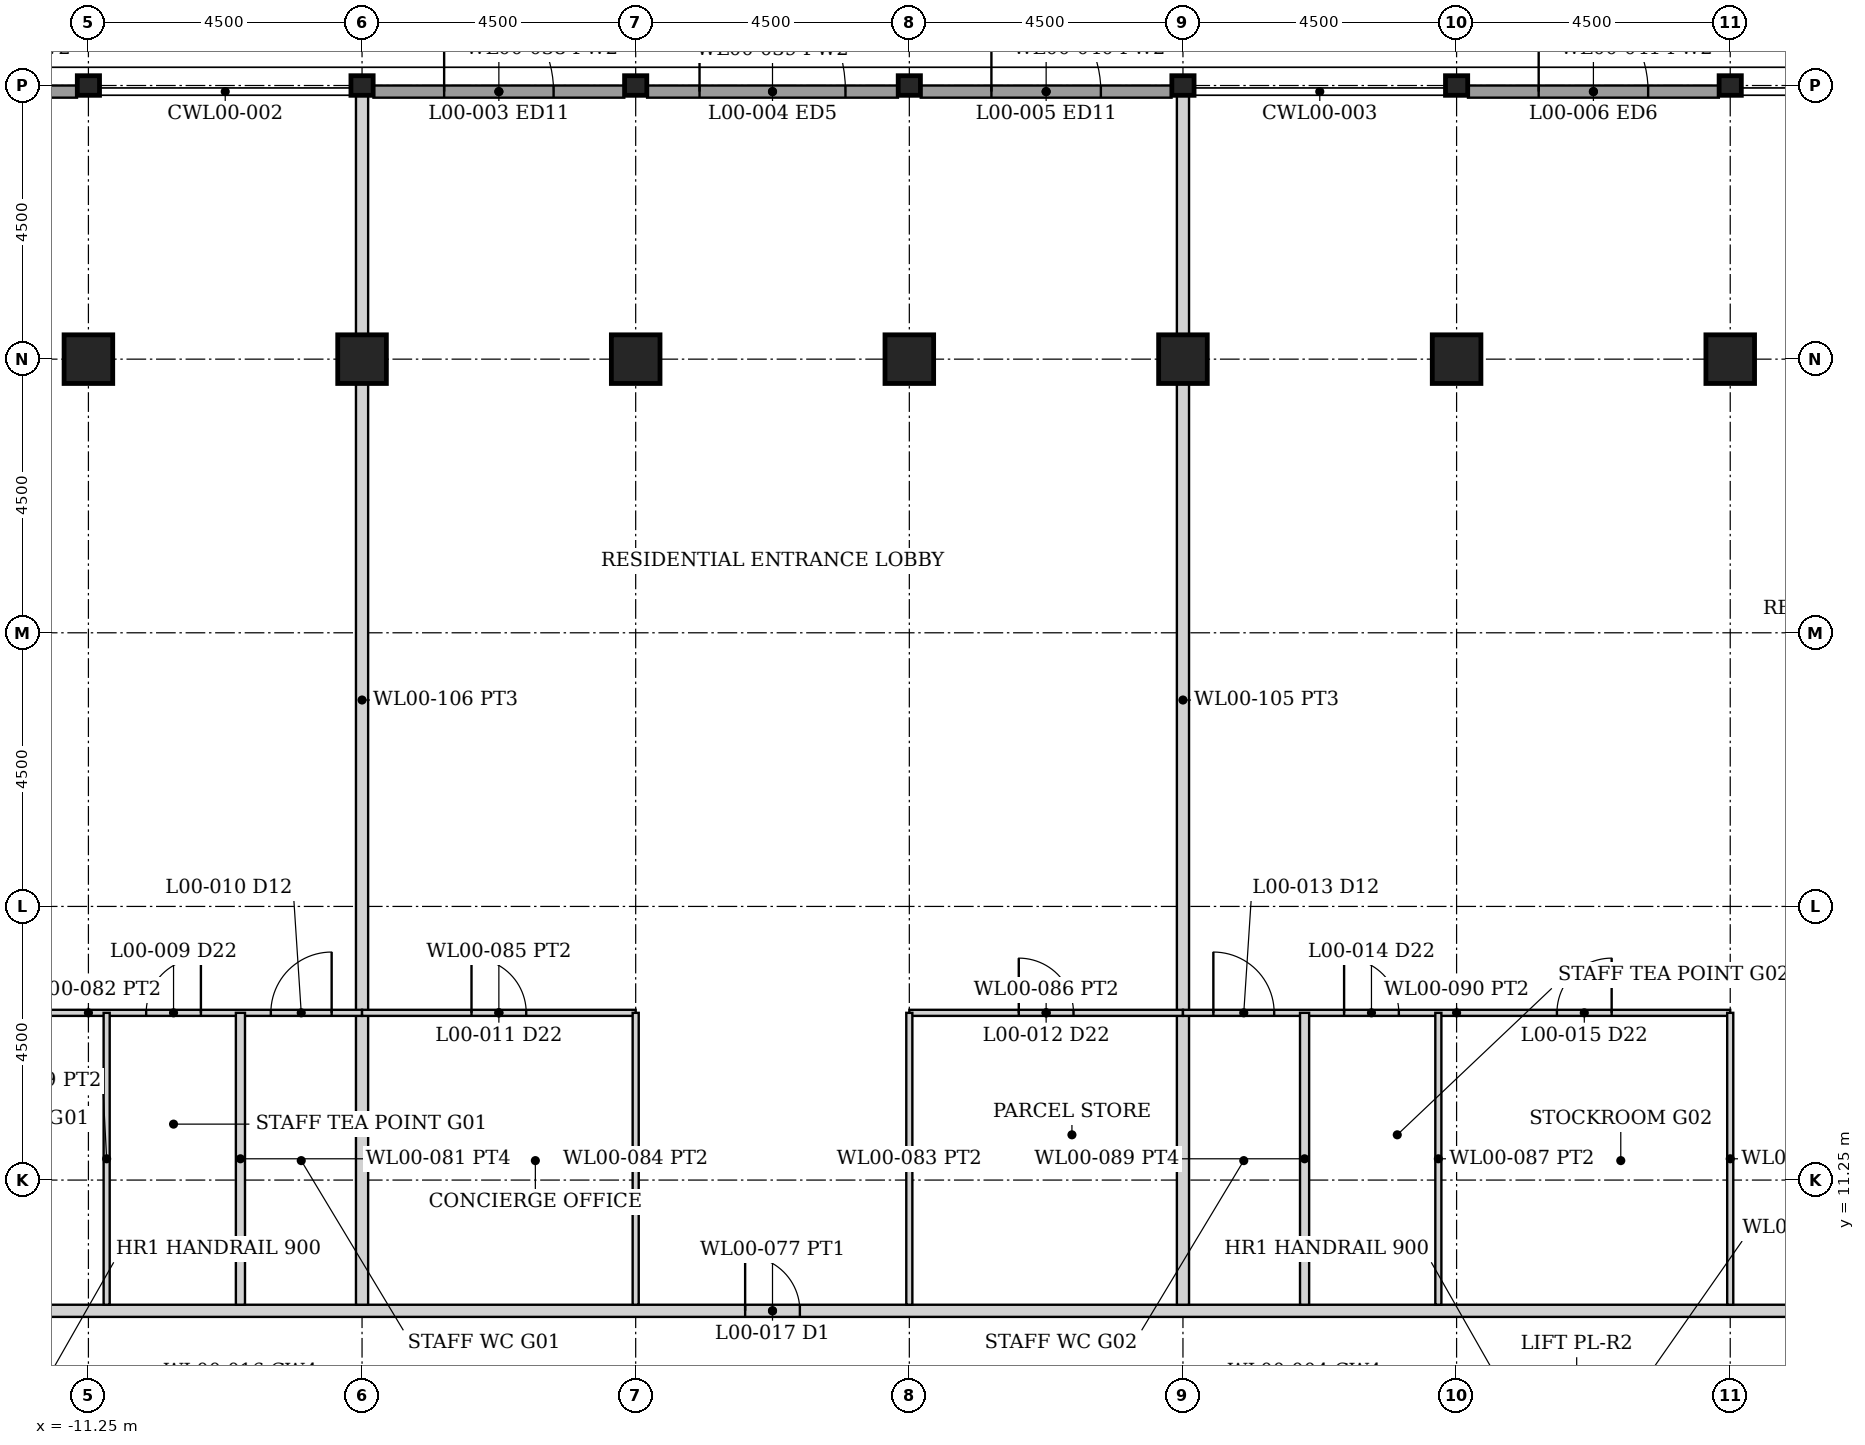
"""IFC4 building model, lengths in metres.
Left out: names, types, materials, properties, quantities, classifications, styles, units other than length and angle.
Written with IfcOpenShell. Run it as: python <this file> out.ifc"""

import sys

from ifc_helpers import new_model, si_unit, direction, frame, frame_2d, origin, origin_2d, place, context, subcontext, project, spatial, rectangle, hollow_rectangle, i_section, extrude, element, fill, save


model = new_model("IFC4")
c1 = context("Model", 3, precision=1e-05, world=origin(), true_north=direction((0.0, 1.0)))
c2 = subcontext(c1, "Body", "Model", "MODEL_VIEW")
j1 = project(units=[si_unit("LENGTHUNIT", "METRE"), si_unit("PLANEANGLEUNIT", "RADIAN")], contexts=[c1])
p1 = place(None, origin())
s1 = spatial("IfcSite", under=j1, at=p1, CompositionType="ELEMENT")
p2 = place(p1, origin())
s2 = spatial("IfcBuilding", under=s1, at=p2, CompositionType="ELEMENT")
p3 = place(p2, origin())
s3 = spatial("IfcBuildingStorey", under=s2, at=p3, CompositionType="ELEMENT", Elevation=0.0)
for number, where, z_axis, x_axis in (
    (1, (-11.25, 24.75, -0.3), (0.0, 0.0, 1.0), (0.0, 1.0, 0.0)),
    (2, (-6.75, 24.75, -0.3), (0.0, 0.0, 1.0), (0.0, 1.0, 0.0)),
    (3, (-2.25, 24.75, -0.3), (0.0, 0.0, 1.0), (0.0, 1.0, 0.0)),
    (4, (2.25, 24.75, -0.3), (0.0, 0.0, 1.0), (0.0, 1.0, 0.0)),
    (5, (6.75, 24.75, -0.3), (0.0, 0.0, 1.0), (0.0, 1.0, 0.0)),
    (6, (11.25, 24.75, -0.3), (0.0, 0.0, 1.0), (0.0, 1.0, 0.0)),
    (7, (15.75, 24.75, -0.3), (0.0, 0.0, 1.0), (0.0, 1.0, 0.0)),
):
    element("IfcColumn", number, at=place(p3, frame(where, z_axis=z_axis, x_axis=x_axis)), inside=s3, PredefinedType="COLUMN", context=c2, shape_type="SweptSolid", body=[
        extrude(hollow_rectangle(XDim=0.8, YDim=0.8, WallThickness=0.08, at=origin_2d()), origin(), (0.0, 0.0, 1.0), 6.3),
    ])
for number, where, z_axis, x_axis in (
    (8, (-11.25, 29.25, -0.3), (0.0, 0.0, 1.0), (0.0, 1.0, 0.0)),
    (9, (-6.75, 29.25, -0.3), (0.0, 0.0, 1.0), (0.0, 1.0, 0.0)),
    (10, (-2.25, 29.25, -0.3), (0.0, 0.0, 1.0), (0.0, 1.0, 0.0)),
    (11, (2.25, 29.25, -0.3), (0.0, 0.0, 1.0), (0.0, 1.0, 0.0)),
    (12, (6.75, 29.25, -0.3), (0.0, 0.0, 1.0), (0.0, 1.0, 0.0)),
    (13, (11.25, 29.25, -0.3), (0.0, 0.0, 1.0), (0.0, 1.0, 0.0)),
    (14, (15.75, 29.25, -0.3), (0.0, 0.0, 1.0), (0.0, 1.0, 0.0)),
):
    element("IfcColumn", number, at=place(p3, frame(where, z_axis=z_axis, x_axis=x_axis)), inside=s3, PredefinedType="COLUMN", context=c2, shape_type="SweptSolid", body=[
        extrude(i_section(OverallWidth=0.322, OverallDepth=0.365, WebThickness=0.027, FlangeThickness=0.044, FilletRadius=0.015, at=origin_2d()), origin(), (0.0, 0.0, 1.0), 6.3),
    ])
p4 = place(p3, frame((-15.562, 29.15, 0.0), z_axis=(0.0, 0.0, 1.0), x_axis=(1.0, 0.0, 0.0)))
e15 = element("IfcWall", 15, at=p4, inside=s3, PredefinedType="SOLIDWALL", context=c2, shape_type="SweptSolid", body=[
    extrude(rectangle(XDim=4.125, YDim=0.2, at=frame_2d((2.062, 0.0))), origin(), (0.0, 0.0, 1.0), 5.133),
])
p5 = place(p4, frame((1.162, 0.0, 0.0)))
e16 = element("IfcOpeningElement", 16, at=p5, cuts=e15, PredefinedType="OPENING", context=c2, shape_type="SweptSolid", body=[
    extrude(rectangle(XDim=1.8, YDim=2.7, at=frame_2d((0.9, 1.35))), frame((0.0, 0.11, 0.0), z_axis=(0.0, -1.0, 0.0), x_axis=(1.0, 0.0, 0.0)), (0.0, 0.0, 1.0), 0.22),
])
p6 = place(p3, frame((-6.562, 29.15, 0.0), z_axis=(0.0, 0.0, 1.0), x_axis=(1.0, 0.0, 0.0)))
e17 = element("IfcWall", 17, at=p6, inside=s3, PredefinedType="SOLIDWALL", context=c2, shape_type="SweptSolid", body=[
    extrude(rectangle(XDim=4.125, YDim=0.2, at=frame_2d((2.062, 0.0))), origin(), (0.0, 0.0, 1.0), 5.133),
])
p7 = place(p6, frame((1.162, 0.0, 0.0)))
e18 = element("IfcOpeningElement", 18, at=p7, cuts=e17, PredefinedType="OPENING", context=c2, shape_type="SweptSolid", body=[
    extrude(rectangle(XDim=1.8, YDim=2.7, at=frame_2d((0.9, 1.35))), frame((0.0, 0.11, 0.0), z_axis=(0.0, -1.0, 0.0), x_axis=(1.0, 0.0, 0.0)), (0.0, 0.0, 1.0), 0.22),
])
p8 = place(p3, frame((-2.062, 29.15, 0.0), z_axis=(0.0, 0.0, 1.0), x_axis=(1.0, 0.0, 0.0)))
e19 = element("IfcWall", 19, at=p8, inside=s3, PredefinedType="SOLIDWALL", context=c2, shape_type="SweptSolid", body=[
    extrude(rectangle(XDim=4.125, YDim=0.2, at=frame_2d((2.062, 0.0))), origin(), (0.0, 0.0, 1.0), 5.133),
])
p9 = place(p8, frame((0.862, 0.0, 0.0)))
e20 = element("IfcOpeningElement", 20, at=p9, cuts=e19, PredefinedType="OPENING", context=c2, shape_type="SweptSolid", body=[
    extrude(rectangle(XDim=2.4, YDim=2.7, at=frame_2d((1.2, 1.35))), frame((0.0, 0.11, 0.0), z_axis=(0.0, -1.0, 0.0), x_axis=(1.0, 0.0, 0.0)), (0.0, 0.0, 1.0), 0.22),
])
p10 = place(p3, frame((2.438, 29.15, 0.0), z_axis=(0.0, 0.0, 1.0), x_axis=(1.0, 0.0, 0.0)))
e21 = element("IfcWall", 21, at=p10, inside=s3, PredefinedType="SOLIDWALL", context=c2, shape_type="SweptSolid", body=[
    extrude(rectangle(XDim=4.125, YDim=0.2, at=frame_2d((2.062, 0.0))), origin(), (0.0, 0.0, 1.0), 5.133),
])
p11 = place(p10, frame((1.162, 0.0, 0.0)))
e22 = element("IfcOpeningElement", 22, at=p11, cuts=e21, PredefinedType="OPENING", context=c2, shape_type="SweptSolid", body=[
    extrude(rectangle(XDim=1.8, YDim=2.7, at=frame_2d((0.9, 1.35))), frame((0.0, 0.11, 0.0), z_axis=(0.0, -1.0, 0.0), x_axis=(1.0, 0.0, 0.0)), (0.0, 0.0, 1.0), 0.22),
])
p12 = place(p3, frame((11.438, 29.15, 0.0), z_axis=(0.0, 0.0, 1.0), x_axis=(1.0, 0.0, 0.0)))
e23 = element("IfcWall", 23, at=p12, inside=s3, PredefinedType="SOLIDWALL", context=c2, shape_type="SweptSolid", body=[
    extrude(rectangle(XDim=4.125, YDim=0.2, at=frame_2d((2.062, 0.0))), origin(), (0.0, 0.0, 1.0), 5.133),
])
p13 = place(p12, frame((1.162, 0.0, 0.0)))
e24 = element("IfcOpeningElement", 24, at=p13, cuts=e23, PredefinedType="OPENING", context=c2, shape_type="SweptSolid", body=[
    extrude(rectangle(XDim=1.8, YDim=2.7, at=frame_2d((0.9, 1.35))), frame((0.0, 0.11, 0.0), z_axis=(0.0, -1.0, 0.0), x_axis=(1.0, 0.0, 0.0)), (0.0, 0.0, 1.0), 0.22),
])
p14 = place(p3, frame((-25.075, 9.1, 0.0), z_axis=(0.0, 0.0, 1.0), x_axis=(1.0, 0.0, 0.0)))
e25 = element("IfcWall", 25, at=p14, inside=s3, PredefinedType="PARTITIONING", context=c2, shape_type="SweptSolid", body=[
    extrude(rectangle(XDim=50.15, YDim=0.2, at=frame_2d((25.075, 0.0))), origin(), (0.0, 0.0, 1.0), 4.829),
])
p15 = place(p14, frame((6.85, 0.0, 0.0)))
e26 = element("IfcOpeningElement", 26, at=p15, cuts=e25, PredefinedType="OPENING", context=c2, shape_type="SweptSolid", body=[
    extrude(rectangle(XDim=0.9, YDim=2.1, at=frame_2d((0.45, 1.05))), frame((0.0, 0.11, 0.0), z_axis=(0.0, -1.0, 0.0), x_axis=(1.0, 0.0, 0.0)), (0.0, 0.0, 1.0), 0.22),
])
p16 = place(p14, frame((24.625, 0.0, 0.0)))
e27 = element("IfcOpeningElement", 27, at=p16, cuts=e25, PredefinedType="OPENING", context=c2, shape_type="SweptSolid", body=[
    extrude(rectangle(XDim=0.9, YDim=2.1, at=frame_2d((0.45, 1.05))), frame((0.0, 0.11, 0.0), z_axis=(0.0, -1.0, 0.0), x_axis=(1.0, 0.0, 0.0)), (0.0, 0.0, 1.0), 0.22),
])
p17 = place(p14, frame((42.4, 0.0, 0.0)))
e28 = element("IfcOpeningElement", 28, at=p17, cuts=e25, PredefinedType="OPENING", context=c2, shape_type="SweptSolid", body=[
    extrude(rectangle(XDim=0.9, YDim=2.1, at=frame_2d((0.45, 1.05))), frame((0.0, 0.11, 0.0), z_axis=(0.0, -1.0, 0.0), x_axis=(1.0, 0.0, 0.0)), (0.0, 0.0, 1.0), 0.22),
])
for number, where, z_axis, x_axis in (
    (29, (-6.75, 9.2, 0.0), (0.0, 0.0, 1.0), (0.0, 1.0, 0.0)),
    (30, (6.75, 9.2, 0.0), (0.0, 0.0, 1.0), (0.0, 1.0, 0.0)),
):
    element("IfcWall", number, at=place(p3, frame(where, z_axis=z_axis, x_axis=x_axis)), inside=s3, PredefinedType="PARTITIONING", context=c2, shape_type="SweptSolid", body=[
        extrude(rectangle(XDim=19.889, YDim=0.2, at=frame_2d((9.944, 0.0))), origin(), (0.0, 0.0, 1.0), 4.829),
    ])
p18 = place(p3, frame((-15.75, 14.0, 0.0), z_axis=(0.0, 0.0, 1.0), x_axis=(1.0, 0.0, 0.0)))
e31 = element("IfcWall", 31, at=p18, inside=s3, PredefinedType="PARTITIONING", context=c2, shape_type="SweptSolid", body=[
    extrude(rectangle(XDim=9.0, YDim=0.1, at=frame_2d((4.5, 0.0))), origin(), (0.0, 0.0, 1.0), 4.829),
])
p19 = place(p18, frame((1.95, 0.0, 0.0)))
e32 = element("IfcOpeningElement", 32, at=p19, cuts=e31, PredefinedType="OPENING", context=c2, shape_type="SweptSolid", body=[
    extrude(rectangle(XDim=0.9, YDim=2.1, at=frame_2d((0.45, 1.05))), frame((0.0, 0.06, 0.0), z_axis=(0.0, -1.0, 0.0), x_axis=(1.0, 0.0, 0.0)), (0.0, 0.0, 1.0), 0.12),
])
p20 = place(p18, frame((5.45, 0.0, 0.0)))
e33 = element("IfcOpeningElement", 33, at=p20, cuts=e31, PredefinedType="OPENING", context=c2, shape_type="SweptSolid", body=[
    extrude(rectangle(XDim=0.9, YDim=2.1, at=frame_2d((0.45, 1.05))), frame((0.0, 0.06, 0.0), z_axis=(0.0, -1.0, 0.0), x_axis=(1.0, 0.0, 0.0)), (0.0, 0.0, 1.0), 0.12),
])
p21 = place(p18, frame((7.5, 0.0, 0.0)))
e34 = element("IfcOpeningElement", 34, at=p21, cuts=e31, PredefinedType="OPENING", context=c2, shape_type="SweptSolid", body=[
    extrude(rectangle(XDim=1.0, YDim=2.1, at=frame_2d((0.5, 1.05))), frame((0.0, 0.06, 0.0), z_axis=(0.0, -1.0, 0.0), x_axis=(1.0, 0.0, 0.0)), (0.0, 0.0, 1.0), 0.12),
])
p22 = place(p3, frame((-10.95, 9.2, 0.0), z_axis=(0.0, 0.0, 1.0), x_axis=(0.0, 1.0, 0.0)))
e35 = element("IfcWall", 35, at=p22, inside=s3, PredefinedType="PARTITIONING", context=c2, shape_type="SweptSolid", body=[
    extrude(rectangle(XDim=4.8, YDim=0.1, at=frame_2d((2.4, 0.0))), origin(), (0.0, 0.0, 1.0), 4.829),
])
p23 = place(p3, frame((-8.75, 9.2, 0.0), z_axis=(0.0, 0.0, 1.0), x_axis=(0.0, 1.0, 0.0)))
e36 = element("IfcWall", 36, at=p23, inside=s3, PredefinedType="PARTITIONING", context=c2, shape_type="SweptSolid", body=[
    extrude(rectangle(XDim=4.8, YDim=0.15, at=frame_2d((2.4, 0.0))), origin(), (0.0, 0.0, 1.0), 4.829),
])
p24 = place(p3, frame((-6.75, 14.0, 0.0), z_axis=(0.0, 0.0, 1.0), x_axis=(1.0, 0.0, 0.0)))
e37 = element("IfcWall", 37, at=p24, inside=s3, PredefinedType="PARTITIONING", context=c2, shape_type="SweptSolid", body=[
    extrude(rectangle(XDim=4.5, YDim=0.1, at=frame_2d((2.25, 0.0))), origin(), (0.0, 0.0, 1.0), 4.829),
])
p25 = place(p24, frame((1.8, 0.0, 0.0)))
e38 = element("IfcOpeningElement", 38, at=p25, cuts=e37, PredefinedType="OPENING", context=c2, shape_type="SweptSolid", body=[
    extrude(rectangle(XDim=0.9, YDim=2.1, at=frame_2d((0.45, 1.05))), frame((0.0, 0.06, 0.0), z_axis=(0.0, -1.0, 0.0), x_axis=(1.0, 0.0, 0.0)), (0.0, 0.0, 1.0), 0.12),
])
p26 = place(p3, frame((2.25, 14.0, 0.0), z_axis=(0.0, 0.0, 1.0), x_axis=(1.0, 0.0, 0.0)))
e39 = element("IfcWall", 39, at=p26, inside=s3, PredefinedType="PARTITIONING", context=c2, shape_type="SweptSolid", body=[
    extrude(rectangle(XDim=4.5, YDim=0.1, at=frame_2d((2.25, 0.0))), origin(), (0.0, 0.0, 1.0), 4.829),
])
p27 = place(p26, frame((1.8, 0.0, 0.0)))
e40 = element("IfcOpeningElement", 40, at=p27, cuts=e39, PredefinedType="OPENING", context=c2, shape_type="SweptSolid", body=[
    extrude(rectangle(XDim=0.9, YDim=2.1, at=frame_2d((0.45, 1.05))), frame((0.0, 0.06, 0.0), z_axis=(0.0, -1.0, 0.0), x_axis=(1.0, 0.0, 0.0)), (0.0, 0.0, 1.0), 0.12),
])
for number, where, z_axis, x_axis in (
    (41, (-2.25, 9.2, 0.0), (0.0, 0.0, 1.0), (0.0, 1.0, 0.0)),
    (42, (2.25, 9.2, 0.0), (0.0, 0.0, 1.0), (0.0, 1.0, 0.0)),
):
    element("IfcWall", number, at=place(p3, frame(where, z_axis=z_axis, x_axis=x_axis)), inside=s3, PredefinedType="PARTITIONING", context=c2, shape_type="SweptSolid", body=[
        extrude(rectangle(XDim=4.8, YDim=0.1, at=frame_2d((2.4, 0.0))), origin(), (0.0, 0.0, 1.0), 4.829),
    ])
p28 = place(p3, frame((6.75, 14.0, 0.0), z_axis=(0.0, 0.0, 1.0), x_axis=(1.0, 0.0, 0.0)))
e43 = element("IfcWall", 43, at=p28, inside=s3, PredefinedType="PARTITIONING", context=c2, shape_type="SweptSolid", body=[
    extrude(rectangle(XDim=9.0, YDim=0.1, at=frame_2d((4.5, 0.0))), origin(), (0.0, 0.0, 1.0), 4.829),
])
p29 = place(p28, frame((6.15, 0.0, 0.0)))
e44 = element("IfcOpeningElement", 44, at=p29, cuts=e43, PredefinedType="OPENING", context=c2, shape_type="SweptSolid", body=[
    extrude(rectangle(XDim=0.9, YDim=2.1, at=frame_2d((0.45, 1.05))), frame((0.0, 0.06, 0.0), z_axis=(0.0, -1.0, 0.0), x_axis=(1.0, 0.0, 0.0)), (0.0, 0.0, 1.0), 0.12),
])
p30 = place(p28, frame((2.65, 0.0, 0.0)))
e45 = element("IfcOpeningElement", 45, at=p30, cuts=e43, PredefinedType="OPENING", context=c2, shape_type="SweptSolid", body=[
    extrude(rectangle(XDim=0.9, YDim=2.1, at=frame_2d((0.45, 1.05))), frame((0.0, 0.06, 0.0), z_axis=(0.0, -1.0, 0.0), x_axis=(1.0, 0.0, 0.0)), (0.0, 0.0, 1.0), 0.12),
])
p31 = place(p28, frame((0.5, 0.0, 0.0)))
e46 = element("IfcOpeningElement", 46, at=p31, cuts=e43, PredefinedType="OPENING", context=c2, shape_type="SweptSolid", body=[
    extrude(rectangle(XDim=1.0, YDim=2.1, at=frame_2d((0.5, 1.05))), frame((0.0, 0.06, 0.0), z_axis=(0.0, -1.0, 0.0), x_axis=(1.0, 0.0, 0.0)), (0.0, 0.0, 1.0), 0.12),
])
p32 = place(p3, frame((8.75, 9.2, 0.0), z_axis=(0.0, 0.0, 1.0), x_axis=(0.0, 1.0, 0.0)))
e47 = element("IfcWall", 47, at=p32, inside=s3, PredefinedType="PARTITIONING", context=c2, shape_type="SweptSolid", body=[
    extrude(rectangle(XDim=4.8, YDim=0.15, at=frame_2d((2.4, 0.0))), origin(), (0.0, 0.0, 1.0), 4.829),
])
for number, where, z_axis, x_axis in (
    (48, (10.95, 9.2, 0.0), (0.0, 0.0, 1.0), (0.0, 1.0, 0.0)),
    (49, (15.75, 9.2, 0.0), (0.0, 0.0, 1.0), (0.0, 1.0, 0.0)),
):
    element("IfcWall", number, at=place(p3, frame(where, z_axis=z_axis, x_axis=x_axis)), inside=s3, PredefinedType="PARTITIONING", context=c2, shape_type="SweptSolid", body=[
        extrude(rectangle(XDim=4.8, YDim=0.1, at=frame_2d((2.4, 0.0))), origin(), (0.0, 0.0, 1.0), 4.829),
    ])
p33 = place(p7, origin())
e50 = element("IfcDoor", 50, at=p33, inside=s3, OperationType="DOUBLE_DOOR_SINGLE_SWING", PredefinedType="DOOR", context=c2, shape_type="SweptSolid", body=[
    extrude(rectangle(XDim=1.8, YDim=2.7, at=frame_2d((0.9, 1.35))), frame((0.0, 0.025, 0.0), z_axis=(0.0, -1.0, 0.0), x_axis=(1.0, 0.0, 0.0)), (0.0, 0.0, 1.0), 0.05),
])
fill(e18, e50)
p34 = place(p9, origin())
e51 = element("IfcDoor", 51, at=p34, inside=s3, OperationType="DOUBLE_DOOR_SINGLE_SWING", PredefinedType="DOOR", context=c2, shape_type="SweptSolid", body=[
    extrude(rectangle(XDim=2.4, YDim=2.7, at=frame_2d((1.2, 1.35))), frame((0.0, 0.025, 0.0), z_axis=(0.0, -1.0, 0.0), x_axis=(1.0, 0.0, 0.0)), (0.0, 0.0, 1.0), 0.05),
])
fill(e20, e51)
p35 = place(p11, origin())
e52 = element("IfcDoor", 52, at=p35, inside=s3, OperationType="DOUBLE_DOOR_SINGLE_SWING", PredefinedType="DOOR", context=c2, shape_type="SweptSolid", body=[
    extrude(rectangle(XDim=1.8, YDim=2.7, at=frame_2d((0.9, 1.35))), frame((0.0, 0.025, 0.0), z_axis=(0.0, -1.0, 0.0), x_axis=(1.0, 0.0, 0.0)), (0.0, 0.0, 1.0), 0.05),
])
fill(e22, e52)
p36 = place(p13, origin())
e53 = element("IfcDoor", 53, at=p36, inside=s3, OperationType="DOUBLE_DOOR_SINGLE_SWING", PredefinedType="DOOR", context=c2, shape_type="SweptSolid", body=[
    extrude(rectangle(XDim=1.8, YDim=2.7, at=frame_2d((0.9, 1.35))), frame((0.0, 0.025, 0.0), z_axis=(0.0, -1.0, 0.0), x_axis=(1.0, 0.0, 0.0)), (0.0, 0.0, 1.0), 0.05),
])
fill(e24, e53)
p37 = place(p20, origin())
e54 = element("IfcDoor", 54, at=p37, inside=s3, OperationType="SINGLE_SWING_RIGHT", PredefinedType="DOOR", context=c2, shape_type="SweptSolid", body=[
    extrude(rectangle(XDim=0.9, YDim=2.1, at=frame_2d((0.45, 1.05))), frame((0.0, 0.025, 0.0), z_axis=(0.0, -1.0, 0.0), x_axis=(1.0, 0.0, 0.0)), (0.0, 0.0, 1.0), 0.05),
])
fill(e33, e54)
p38 = place(p21, origin())
e55 = element("IfcDoor", 55, at=p38, inside=s3, OperationType="SINGLE_SWING_RIGHT", PredefinedType="DOOR", context=c2, shape_type="SweptSolid", body=[
    extrude(rectangle(XDim=1.0, YDim=2.1, at=frame_2d((0.5, 1.05))), frame((0.0, 0.025, 0.0), z_axis=(0.0, -1.0, 0.0), x_axis=(1.0, 0.0, 0.0)), (0.0, 0.0, 1.0), 0.05),
])
fill(e34, e55)
p39 = place(p25, origin())
e56 = element("IfcDoor", 56, at=p39, inside=s3, OperationType="SINGLE_SWING_LEFT", PredefinedType="DOOR", context=c2, shape_type="SweptSolid", body=[
    extrude(rectangle(XDim=0.9, YDim=2.1, at=frame_2d((0.45, 1.05))), frame((0.0, 0.025, 0.0), z_axis=(0.0, -1.0, 0.0), x_axis=(1.0, 0.0, 0.0)), (0.0, 0.0, 1.0), 0.05),
])
fill(e38, e56)
p40 = place(p27, origin())
e57 = element("IfcDoor", 57, at=p40, inside=s3, OperationType="SINGLE_SWING_LEFT", PredefinedType="DOOR", context=c2, shape_type="SweptSolid", body=[
    extrude(rectangle(XDim=0.9, YDim=2.1, at=frame_2d((0.45, 1.05))), frame((0.0, 0.025, 0.0), z_axis=(0.0, -1.0, 0.0), x_axis=(1.0, 0.0, 0.0)), (0.0, 0.0, 1.0), 0.05),
])
fill(e40, e57)
p41 = place(p16, origin())
e58 = element("IfcDoor", 58, at=p41, inside=s3, OperationType="SINGLE_SWING_LEFT", PredefinedType="DOOR", context=c2, shape_type="SweptSolid", body=[
    extrude(rectangle(XDim=0.9, YDim=2.1, at=frame_2d((0.45, 1.05))), frame((0.0, 0.025, 0.0), z_axis=(0.0, -1.0, 0.0), x_axis=(1.0, 0.0, 0.0)), (0.0, 0.0, 1.0), 0.05),
])
fill(e27, e58)
p42 = place(p29, origin())
e59 = element("IfcDoor", 59, at=p42, inside=s3, OperationType="SINGLE_SWING_RIGHT", PredefinedType="DOOR", context=c2, shape_type="SweptSolid", body=[
    extrude(rectangle(XDim=0.9, YDim=2.1, at=frame_2d((0.45, 1.05))), frame((0.0, 0.025, 0.0), z_axis=(0.0, -1.0, 0.0), x_axis=(1.0, 0.0, 0.0)), (0.0, 0.0, 1.0), 0.05),
])
fill(e44, e59)
p43 = place(p30, origin())
e60 = element("IfcDoor", 60, at=p43, inside=s3, OperationType="SINGLE_SWING_LEFT", PredefinedType="DOOR", context=c2, shape_type="SweptSolid", body=[
    extrude(rectangle(XDim=0.9, YDim=2.1, at=frame_2d((0.45, 1.05))), frame((0.0, 0.025, 0.0), z_axis=(0.0, -1.0, 0.0), x_axis=(1.0, 0.0, 0.0)), (0.0, 0.0, 1.0), 0.05),
])
fill(e45, e60)
p44 = place(p31, origin())
e61 = element("IfcDoor", 61, at=p44, inside=s3, OperationType="SINGLE_SWING_LEFT", PredefinedType="DOOR", context=c2, shape_type="SweptSolid", body=[
    extrude(rectangle(XDim=1.0, YDim=2.1, at=frame_2d((0.5, 1.05))), frame((0.0, 0.025, 0.0), z_axis=(0.0, -1.0, 0.0), x_axis=(1.0, 0.0, 0.0)), (0.0, 0.0, 1.0), 0.05),
])
fill(e46, e61)
save(model, sys.argv[1])
